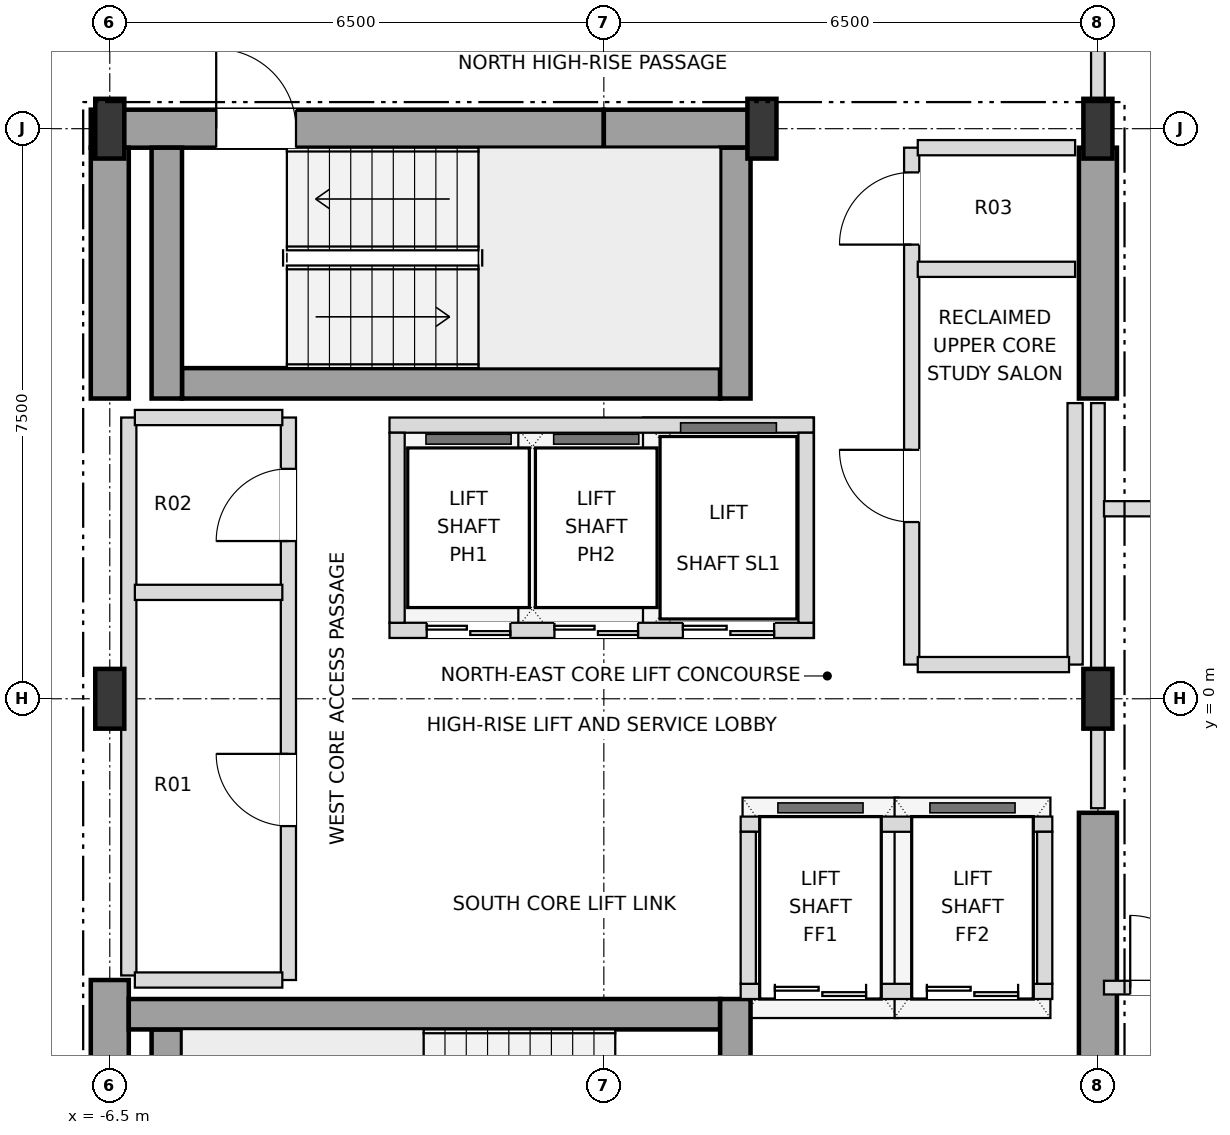
"""IFC4 building model, lengths in metres.
Left out: names, types, materials, properties, quantities, classifications, styles, units other than length and angle.
Written with IfcOpenShell. Run it as: python <this file> out.ifc"""

import sys

from ifc_helpers import new_model, si_unit, direction, frame, frame_2d, origin, origin_2d, place, context, subcontext, project, spatial, rectangle, i_section, extrude, element, fill, save


model = new_model("IFC4")
c1 = context("Model", 3, precision=1e-05, world=origin(), true_north=direction((0.0, 1.0)))
c2 = subcontext(c1, "Body", "Model", "MODEL_VIEW")
j1 = project(units=[si_unit("LENGTHUNIT", "METRE"), si_unit("PLANEANGLEUNIT", "RADIAN")], contexts=[c1])
p1 = place(None, origin())
s1 = spatial("IfcSite", under=j1, at=p1, CompositionType="ELEMENT")
p2 = place(p1, origin())
s2 = spatial("IfcBuilding", under=s1, at=p2, CompositionType="ELEMENT")
p3 = place(p2, frame((0.0, 0.0, 261.9)))
s3 = spatial("IfcBuildingStorey", under=s2, at=p3, CompositionType="ELEMENT", Elevation=261.9)
for number, where, z_axis, x_axis in (
    (1, (-6.5, 0.0, 0.0), (0.0, 0.0, 1.0), (1.0, 0.0, 0.0)),
    (2, (6.5, 0.0, 0.0), (0.0, 0.0, 1.0), (1.0, 0.0, 0.0)),
    (3, (-6.5, 7.5, 0.0), (0.0, 0.0, 1.0), (1.0, 0.0, 0.0)),
    (4, (2.08, 7.5, 0.0), (0.0, 0.0, 1.0), (1.0, 0.0, 0.0)),
    (5, (6.5, 7.5, 0.0), (0.0, 0.0, 1.0), (1.0, 0.0, 0.0)),
):
    element("IfcColumn", number, at=place(p3, frame(where, z_axis=z_axis, x_axis=x_axis)), inside=s3, PredefinedType="COLUMN", context=c2, shape_type="SweptSolid", body=[
        extrude(i_section(OverallWidth=0.382, OverallDepth=0.786, WebThickness=0.02, FlangeThickness=0.033, at=origin_2d()), origin(), (0.0, 0.0, 1.0), 3.6),
    ])
p4 = place(p3, frame((-6.75, 7.5, 0.0), z_axis=(0.0, 0.0, 1.0), x_axis=(1.0, 0.0, 0.0)))
e6 = element("IfcWall", 6, at=p4, inside=s3, PredefinedType="SHEAR", context=c2, shape_type="SweptSolid", body=[
    extrude(rectangle(XDim=6.75, YDim=0.5, at=frame_2d((3.375, 0.0))), origin(), (0.0, 0.0, 1.0), 3.38),
])
p5 = place(p4, frame((1.65, 0.0, 0.0)))
e7 = element("IfcOpeningElement", 7, at=p5, cuts=e6, PredefinedType="OPENING", context=c2, shape_type="SweptSolid", body=[
    extrude(rectangle(XDim=1.05, YDim=2.15, at=frame_2d((0.525, 1.075))), frame((0.0, 0.26, 0.0), z_axis=(0.0, -1.0, 0.0), x_axis=(1.0, 0.0, 0.0)), (0.0, 0.0, 1.0), 0.52),
])
p6 = place(p3, frame((0.0, 7.5, 0.0), z_axis=(0.0, 0.0, 1.0), x_axis=(1.0, 0.0, 0.0)))
e8 = element("IfcWall", 8, at=p6, inside=s3, PredefinedType="SHEAR", context=c2, shape_type="SweptSolid", body=[
    extrude(rectangle(XDim=2.08, YDim=0.5, at=frame_2d((1.04, 0.0))), origin(), (0.0, 0.0, 1.0), 3.38),
])
p7 = place(p3, frame((-6.5, -7.25, 0.0), z_axis=(0.0, 0.0, 1.0), x_axis=(0.0, 1.0, 0.0)))
e9 = element("IfcWall", 9, at=p7, inside=s3, PredefinedType="SHEAR", context=c2, shape_type="SweptSolid", body=[
    extrude(rectangle(XDim=3.55, YDim=0.5, at=frame_2d((1.775, 0.0))), origin(), (0.0, 0.0, 1.0), 3.38),
])
p8 = place(p3, frame((-6.5, 3.95, 0.0), z_axis=(0.0, 0.0, 1.0), x_axis=(0.0, 1.0, 0.0)))
e10 = element("IfcWall", 10, at=p8, inside=s3, PredefinedType="SHEAR", context=c2, shape_type="SweptSolid", body=[
    extrude(rectangle(XDim=3.3, YDim=0.5, at=frame_2d((1.65, 0.0))), origin(), (0.0, 0.0, 1.0), 3.38),
])
p9 = place(p3, frame((6.5, -7.25, 0.0), z_axis=(0.0, 0.0, 1.0), x_axis=(0.0, 1.0, 0.0)))
e11 = element("IfcWall", 11, at=p9, inside=s3, PredefinedType="SHEAR", context=c2, shape_type="SweptSolid", body=[
    extrude(rectangle(XDim=5.75, YDim=0.5, at=frame_2d((2.875, 0.0))), origin(), (0.0, 0.0, 1.0), 3.38),
])
p10 = place(p9, frame((0.85, 0.0, 0.0)))
e12 = element("IfcOpeningElement", 12, at=p10, cuts=e11, PredefinedType="OPENING", context=c2, shape_type="SweptSolid", body=[
    extrude(rectangle(XDim=1.05, YDim=2.15, at=frame_2d((0.525, 1.075))), frame((0.0, 0.26, 0.0), z_axis=(0.0, -1.0, 0.0), x_axis=(1.0, 0.0, 0.0)), (0.0, 0.0, 1.0), 0.52),
])
p11 = place(p3, frame((6.5, 3.95, 0.0), z_axis=(0.0, 0.0, 1.0), x_axis=(0.0, 1.0, 0.0)))
e13 = element("IfcWall", 13, at=p11, inside=s3, PredefinedType="SHEAR", context=c2, shape_type="SweptSolid", body=[
    extrude(rectangle(XDim=3.3, YDim=0.5, at=frame_2d((1.65, 0.0))), origin(), (0.0, 0.0, 1.0), 3.38),
])
p12 = place(p3, frame((-5.75, -7.25, 0.0), z_axis=(0.0, 0.0, 1.0), x_axis=(0.0, 1.0, 0.0)))
e14 = element("IfcWall", 14, at=p12, inside=s3, PredefinedType="SHEAR", context=c2, shape_type="SweptSolid", body=[
    extrude(rectangle(XDim=2.9, YDim=0.4, at=frame_2d((1.45, 0.0))), origin(), (0.0, 0.0, 1.0), 3.38),
])
p13 = place(p3, frame((-6.25, -4.15, 0.0), z_axis=(0.0, 0.0, 1.0), x_axis=(1.0, 0.0, 0.0)))
e15 = element("IfcWall", 15, at=p13, inside=s3, PredefinedType="SHEAR", context=c2, shape_type="SweptSolid", body=[
    extrude(rectangle(XDim=7.78, YDim=0.4, at=frame_2d((3.89, 0.0))), origin(), (0.0, 0.0, 1.0), 3.38),
])
p14 = place(p3, frame((1.73, -7.25, 0.0), z_axis=(0.0, 0.0, 1.0), x_axis=(0.0, 1.0, 0.0)))
e16 = element("IfcWall", 16, at=p14, inside=s3, PredefinedType="SHEAR", context=c2, shape_type="SweptSolid", body=[
    extrude(rectangle(XDim=3.3, YDim=0.4, at=frame_2d((1.65, 0.0))), origin(), (0.0, 0.0, 1.0), 3.38),
])
p15 = place(p14, frame((0.9, 0.0, 0.0)))
e17 = element("IfcOpeningElement", 17, at=p15, cuts=e16, PredefinedType="OPENING", context=c2, shape_type="SweptSolid", body=[
    extrude(rectangle(XDim=1.05, YDim=2.15, at=frame_2d((0.525, 1.075))), frame((0.0, 0.21, 0.0), z_axis=(0.0, -1.0, 0.0), x_axis=(1.0, 0.0, 0.0)), (0.0, 0.0, 1.0), 0.42),
])
p16 = place(p3, frame((-5.55, 4.15, 0.0), z_axis=(0.0, 0.0, 1.0), x_axis=(1.0, 0.0, 0.0)))
e18 = element("IfcWall", 18, at=p16, inside=s3, PredefinedType="SHEAR", context=c2, shape_type="SweptSolid", body=[
    extrude(rectangle(XDim=7.08, YDim=0.4, at=frame_2d((3.54, 0.0))), origin(), (0.0, 0.0, 1.0), 3.38),
])
for number, where, z_axis, x_axis in (
    (19, (1.73, 3.95, 0.0), (0.0, 0.0, 1.0), (0.0, 1.0, 0.0)),
    (20, (-5.75, 3.95, 0.0), (0.0, 0.0, 1.0), (0.0, 1.0, 0.0)),
):
    element("IfcWall", number, at=place(p3, frame(where, z_axis=z_axis, x_axis=x_axis)), inside=s3, PredefinedType="SHEAR", context=c2, shape_type="SweptSolid", body=[
        extrude(rectangle(XDim=3.3, YDim=0.4, at=frame_2d((1.65, 0.0))), origin(), (0.0, 0.0, 1.0), 3.38),
    ])
p17 = place(p3, frame((-2.82, 0.9, 0.0), z_axis=(0.0, 0.0, 1.0), x_axis=(1.0, 0.0, 0.0)))
e21 = element("IfcWall", 21, at=p17, inside=s3, PredefinedType="SOLIDWALL", context=c2, shape_type="SweptSolid", body=[
    extrude(rectangle(XDim=5.58, YDim=0.2, at=frame_2d((2.79, 0.0))), origin(), (0.0, 0.0, 1.0), 3.38),
])
p18 = place(p17, frame((0.49, 0.0, 0.0)))
e22 = element("IfcOpeningElement", 22, at=p18, cuts=e21, PredefinedType="OPENING", context=c2, shape_type="SweptSolid", body=[
    extrude(rectangle(XDim=1.1, YDim=2.15, at=frame_2d((0.55, 1.075))), frame((0.0, 0.11, 0.0), z_axis=(0.0, -1.0, 0.0), x_axis=(1.0, 0.0, 0.0)), (0.0, 0.0, 1.0), 0.22),
])
p19 = place(p17, frame((2.17, 0.0, 0.0)))
e23 = element("IfcOpeningElement", 23, at=p19, cuts=e21, PredefinedType="OPENING", context=c2, shape_type="SweptSolid", body=[
    extrude(rectangle(XDim=1.1, YDim=2.15, at=frame_2d((0.55, 1.075))), frame((0.0, 0.11, 0.0), z_axis=(0.0, -1.0, 0.0), x_axis=(1.0, 0.0, 0.0)), (0.0, 0.0, 1.0), 0.22),
])
p20 = place(p17, frame((3.86, 0.0, 0.0)))
e24 = element("IfcOpeningElement", 24, at=p20, cuts=e21, PredefinedType="OPENING", context=c2, shape_type="SweptSolid", body=[
    extrude(rectangle(XDim=1.2, YDim=2.2, at=frame_2d((0.6, 1.1))), frame((0.0, 0.11, 0.0), z_axis=(0.0, -1.0, 0.0), x_axis=(1.0, 0.0, 0.0)), (0.0, 0.0, 1.0), 0.22),
])
p21 = place(p3, frame((-2.82, 3.6, 0.0), z_axis=(0.0, 0.0, 1.0), x_axis=(1.0, 0.0, 0.0)))
e25 = element("IfcWall", 25, at=p21, inside=s3, PredefinedType="SOLIDWALL", context=c2, shape_type="SweptSolid", body=[
    extrude(rectangle(XDim=5.58, YDim=0.2, at=frame_2d((2.79, 0.0))), origin(), (0.0, 0.0, 1.0), 3.38),
])
for number, where, z_axis, x_axis in (
    (26, (-2.72, 1.0, 0.0), (0.0, 0.0, 1.0), (0.0, 1.0, 0.0)),
    (27, (2.66, 1.0, 0.0), (0.0, 0.0, 1.0), (0.0, 1.0, 0.0)),
):
    element("IfcWall", number, at=place(p3, frame(where, z_axis=z_axis, x_axis=x_axis)), inside=s3, PredefinedType="SOLIDWALL", context=c2, shape_type="SweptSolid", body=[
        extrude(rectangle(XDim=2.5, YDim=0.2, at=frame_2d((1.25, 0.0))), origin(), (0.0, 0.0, 1.0), 3.38),
    ])
p22 = place(p3, frame((1.8, -3.85, 0.0), z_axis=(0.0, 0.0, 1.0), x_axis=(1.0, 0.0, 0.0)))
e28 = element("IfcWall", 28, at=p22, inside=s3, PredefinedType="SOLIDWALL", context=c2, shape_type="SweptSolid", body=[
    extrude(rectangle(XDim=4.1, YDim=0.2, at=frame_2d((2.05, 0.0))), origin(), (0.0, 0.0, 1.0), 3.38),
])
p23 = place(p22, frame((0.45, 0.0, 0.0)))
e29 = element("IfcOpeningElement", 29, at=p23, cuts=e28, PredefinedType="OPENING", context=c2, shape_type="SweptSolid", body=[
    extrude(rectangle(XDim=1.2, YDim=2.2, at=frame_2d((0.6, 1.1))), frame((0.0, 0.11, 0.0), z_axis=(0.0, -1.0, 0.0), x_axis=(1.0, 0.0, 0.0)), (0.0, 0.0, 1.0), 0.22),
])
p24 = place(p22, frame((2.45, 0.0, 0.0)))
e30 = element("IfcOpeningElement", 30, at=p24, cuts=e28, PredefinedType="OPENING", context=c2, shape_type="SweptSolid", body=[
    extrude(rectangle(XDim=1.2, YDim=2.2, at=frame_2d((0.6, 1.1))), frame((0.0, 0.11, 0.0), z_axis=(0.0, -1.0, 0.0), x_axis=(1.0, 0.0, 0.0)), (0.0, 0.0, 1.0), 0.22),
])
p25 = place(p3, frame((1.8, -1.65, 0.0), z_axis=(0.0, 0.0, 1.0), x_axis=(1.0, 0.0, 0.0)))
e31 = element("IfcWall", 31, at=p25, inside=s3, PredefinedType="SOLIDWALL", context=c2, shape_type="SweptSolid", body=[
    extrude(rectangle(XDim=4.1, YDim=0.2, at=frame_2d((2.05, 0.0))), origin(), (0.0, 0.0, 1.0), 3.38),
])
for number, where, z_axis, x_axis in (
    (32, (1.9, -3.75, 0.0), (0.0, 0.0, 1.0), (0.0, 1.0, 0.0)),
    (33, (5.8, -3.75, 0.0), (0.0, 0.0, 1.0), (0.0, 1.0, 0.0)),
):
    element("IfcWall", number, at=place(p3, frame(where, z_axis=z_axis, x_axis=x_axis)), inside=s3, PredefinedType="SOLIDWALL", context=c2, shape_type="SweptSolid", body=[
        extrude(rectangle(XDim=2.0, YDim=0.2, at=frame_2d((1.0, 0.0))), origin(), (0.0, 0.0, 1.0), 3.38),
    ])
p26 = place(p3, frame((-6.25, -3.64, 0.0), z_axis=(0.0, 0.0, 1.0), x_axis=(0.0, 1.0, 0.0)))
e34 = element("IfcWall", 34, at=p26, inside=s3, PredefinedType="SOLIDWALL", context=c2, shape_type="SweptSolid", body=[
    extrude(rectangle(XDim=7.34, YDim=0.2, at=frame_2d((3.67, 0.0))), origin(), (0.0, 0.0, 1.0), 3.38),
])
p27 = place(p3, frame((-4.15, -3.7, 0.0), z_axis=(0.0, 0.0, 1.0), x_axis=(0.0, 1.0, 0.0)))
e35 = element("IfcWall", 35, at=p27, inside=s3, PredefinedType="SOLIDWALL", context=c2, shape_type="SweptSolid", body=[
    extrude(rectangle(XDim=7.4, YDim=0.2, at=frame_2d((3.7, 0.0))), origin(), (0.0, 0.0, 1.0), 3.38),
])
p28 = place(p27, frame((2.025, 0.0, 0.0)))
e36 = element("IfcOpeningElement", 36, at=p28, cuts=e35, PredefinedType="OPENING", context=c2, shape_type="SweptSolid", body=[
    extrude(rectangle(XDim=0.95, YDim=2.15, at=frame_2d((0.475, 1.075))), frame((0.0, 0.11, 0.0), z_axis=(0.0, -1.0, 0.0), x_axis=(1.0, 0.0, 0.0)), (0.0, 0.0, 1.0), 0.22),
])
p29 = place(p27, frame((5.775, 0.0, 0.0)))
e37 = element("IfcOpeningElement", 37, at=p29, cuts=e35, PredefinedType="OPENING", context=c2, shape_type="SweptSolid", body=[
    extrude(rectangle(XDim=0.95, YDim=2.15, at=frame_2d((0.475, 1.075))), frame((0.0, 0.11, 0.0), z_axis=(0.0, -1.0, 0.0), x_axis=(1.0, 0.0, 0.0)), (0.0, 0.0, 1.0), 0.22),
])
p30 = place(p3, frame((4.05, 0.45, 0.0), z_axis=(0.0, 0.0, 1.0), x_axis=(0.0, 1.0, 0.0)))
e38 = element("IfcWall", 38, at=p30, inside=s3, PredefinedType="SOLIDWALL", context=c2, shape_type="SweptSolid", body=[
    extrude(rectangle(XDim=6.8, YDim=0.2, at=frame_2d((3.4, 0.0))), origin(), (0.0, 0.0, 1.0), 3.38),
])
p31 = place(p30, frame((1.875, 0.0, 0.0)))
e39 = element("IfcOpeningElement", 39, at=p31, cuts=e38, PredefinedType="OPENING", context=c2, shape_type="SweptSolid", body=[
    extrude(rectangle(XDim=0.95, YDim=2.15, at=frame_2d((0.475, 1.075))), frame((0.0, 0.11, 0.0), z_axis=(0.0, -1.0, 0.0), x_axis=(1.0, 0.0, 0.0)), (0.0, 0.0, 1.0), 0.22),
])
p32 = place(p30, frame((5.525, 0.0, 0.0)))
e40 = element("IfcOpeningElement", 40, at=p32, cuts=e38, PredefinedType="OPENING", context=c2, shape_type="SweptSolid", body=[
    extrude(rectangle(XDim=0.95, YDim=2.15, at=frame_2d((0.475, 1.075))), frame((0.0, 0.11, 0.0), z_axis=(0.0, -1.0, 0.0), x_axis=(1.0, 0.0, 0.0)), (0.0, 0.0, 1.0), 0.22),
])
p33 = place(p3, frame((6.2, 0.45, 0.0), z_axis=(0.0, 0.0, 1.0), x_axis=(0.0, 1.0, 0.0)))
e41 = element("IfcWall", 41, at=p33, inside=s3, PredefinedType="SOLIDWALL", context=c2, shape_type="SweptSolid", body=[
    extrude(rectangle(XDim=3.44, YDim=0.2, at=frame_2d((1.72, 0.0))), origin(), (0.0, 0.0, 1.0), 3.38),
])
p34 = place(p3, frame((6.5, -1.44, 0.0), z_axis=(0.0, 0.0, 1.0), x_axis=(0.0, 1.0, 0.0)))
e42 = element("IfcWall", 42, at=p34, inside=s3, PredefinedType="PARTITIONING", context=c2, shape_type="SweptSolid", body=[
    extrude(rectangle(XDim=5.33, YDim=0.18, at=frame_2d((2.665, 0.0))), origin(), (0.0, 0.0, 1.0), 2.826),
])
p35 = place(p3, frame((6.5, 7.31, 0.0), z_axis=(0.0, 0.0, 1.0), x_axis=(0.0, 1.0, 0.0)))
e43 = element("IfcWall", 43, at=p35, inside=s3, PredefinedType="PARTITIONING", context=c2, shape_type="SweptSolid", body=[
    extrude(rectangle(XDim=1.94, YDim=0.18, at=frame_2d((0.97, 0.0))), origin(), (0.0, 0.0, 1.0), 2.826),
])
p36 = place(p3, frame((6.58, -3.8, 0.0), z_axis=(0.0, 0.0, 1.0), x_axis=(1.0, 0.0, 0.0)))
e44 = element("IfcWall", 44, at=p36, inside=s3, PredefinedType="PARTITIONING", context=c2, shape_type="SweptSolid", body=[
    extrude(rectangle(XDim=1.64, YDim=0.18, at=frame_2d((0.82, 0.0))), origin(), (0.0, 0.0, 1.0), 3.38),
])
p37 = place(p36, frame((0.345, 0.0, 0.0)))
e45 = element("IfcOpeningElement", 45, at=p37, cuts=e44, PredefinedType="OPENING", context=c2, shape_type="SweptSolid", body=[
    extrude(rectangle(XDim=0.95, YDim=2.15, at=frame_2d((0.475, 1.075))), frame((0.0, 0.1, 0.0), z_axis=(0.0, -1.0, 0.0), x_axis=(1.0, 0.0, 0.0)), (0.0, 0.0, 1.0), 0.2),
])
p38 = place(p3, frame((-6.17, -3.7, 0.0), z_axis=(0.0, 0.0, 1.0), x_axis=(1.0, 0.0, 0.0)))
e46 = element("IfcWall", 46, at=p38, inside=s3, PredefinedType="SOLIDWALL", context=c2, shape_type="SweptSolid", body=[
    extrude(rectangle(XDim=1.94, YDim=0.2, at=frame_2d((0.97, 0.0))), origin(), (0.0, 0.0, 1.0), 3.38),
])
p39 = place(p3, frame((4.13, 0.45, 0.0), z_axis=(0.0, 0.0, 1.0), x_axis=(1.0, 0.0, 0.0)))
e47 = element("IfcWall", 47, at=p39, inside=s3, PredefinedType="SOLIDWALL", context=c2, shape_type="SweptSolid", body=[
    extrude(rectangle(XDim=1.99, YDim=0.2, at=frame_2d((0.995, 0.0))), origin(), (0.0, 0.0, 1.0), 3.38),
])
p40 = place(p3, frame((-6.17, 1.4, 0.0), z_axis=(0.0, 0.0, 1.0), x_axis=(1.0, 0.0, 0.0)))
e48 = element("IfcWall", 48, at=p40, inside=s3, PredefinedType="SOLIDWALL", context=c2, shape_type="SweptSolid", body=[
    extrude(rectangle(XDim=1.94, YDim=0.2, at=frame_2d((0.97, 0.0))), origin(), (0.0, 0.0, 1.0), 3.38),
])
p41 = place(p3, frame((6.58, 2.5, 0.0), z_axis=(0.0, 0.0, 1.0), x_axis=(1.0, 0.0, 0.0)))
e49 = element("IfcWall", 49, at=p41, inside=s3, PredefinedType="SOLIDWALL", context=c2, shape_type="SweptSolid", body=[
    extrude(rectangle(XDim=3.34, YDim=0.2, at=frame_2d((1.67, 0.0))), origin(), (0.0, 0.0, 1.0), 3.38),
])
p42 = place(p41, frame((1.145, 0.0, 0.0)))
e50 = element("IfcOpeningElement", 50, at=p42, cuts=e49, PredefinedType="OPENING", context=c2, shape_type="SweptSolid", body=[
    extrude(rectangle(XDim=0.95, YDim=2.15, at=frame_2d((0.475, 1.075))), frame((0.0, 0.11, 0.0), z_axis=(0.0, -1.0, 0.0), x_axis=(1.0, 0.0, 0.0)), (0.0, 0.0, 1.0), 0.22),
])
p43 = place(p3, frame((-6.17, 3.7, 0.0), z_axis=(0.0, 0.0, 1.0), x_axis=(1.0, 0.0, 0.0)))
e51 = element("IfcWall", 51, at=p43, inside=s3, PredefinedType="SOLIDWALL", context=c2, shape_type="SweptSolid", body=[
    extrude(rectangle(XDim=1.94, YDim=0.2, at=frame_2d((0.97, 0.0))), origin(), (0.0, 0.0, 1.0), 3.38),
])
for number, where, z_axis, x_axis in (
    (52, (4.13, 5.65, 0.0), (0.0, 0.0, 1.0), (1.0, 0.0, 0.0)),
    (53, (4.13, 7.25, 0.0), (0.0, 0.0, 1.0), (1.0, 0.0, 0.0)),
):
    element("IfcWall", number, at=place(p3, frame(where, z_axis=z_axis, x_axis=x_axis)), inside=s3, PredefinedType="SOLIDWALL", context=c2, shape_type="SweptSolid", body=[
        extrude(rectangle(XDim=2.07, YDim=0.2, at=frame_2d((1.035, 0.0))), origin(), (0.0, 0.0, 1.0), 3.38),
    ])
p44 = place(p5, origin())
e54 = element("IfcDoor", 54, at=p44, inside=s3, OperationType="SINGLE_SWING_LEFT", PredefinedType="DOOR", context=c2, shape_type="SweptSolid", body=[
    extrude(rectangle(XDim=1.05, YDim=2.15, at=frame_2d((0.525, 1.075))), frame((0.0, 0.025, 0.0), z_axis=(0.0, -1.0, 0.0), x_axis=(1.0, 0.0, 0.0)), (0.0, 0.0, 1.0), 0.05),
])
fill(e7, e54)
p45 = place(p18, origin())
e55 = element("IfcDoor", 55, at=p45, inside=s3, OperationType="DOUBLE_DOOR_SLIDING", PredefinedType="DOOR", context=c2, shape_type="SweptSolid", body=[
    extrude(rectangle(XDim=1.1, YDim=2.15, at=frame_2d((0.55, 1.075))), frame((0.0, 0.025, 0.0), z_axis=(0.0, -1.0, 0.0), x_axis=(1.0, 0.0, 0.0)), (0.0, 0.0, 1.0), 0.05),
])
fill(e22, e55)
p46 = place(p19, origin())
e56 = element("IfcDoor", 56, at=p46, inside=s3, OperationType="DOUBLE_DOOR_SLIDING", PredefinedType="DOOR", context=c2, shape_type="SweptSolid", body=[
    extrude(rectangle(XDim=1.1, YDim=2.15, at=frame_2d((0.55, 1.075))), frame((0.0, 0.025, 0.0), z_axis=(0.0, -1.0, 0.0), x_axis=(1.0, 0.0, 0.0)), (0.0, 0.0, 1.0), 0.05),
])
fill(e23, e56)
p47 = place(p20, origin())
e57 = element("IfcDoor", 57, at=p47, inside=s3, OperationType="DOUBLE_DOOR_SLIDING", PredefinedType="DOOR", context=c2, shape_type="SweptSolid", body=[
    extrude(rectangle(XDim=1.2, YDim=2.2, at=frame_2d((0.6, 1.1))), frame((0.0, 0.025, 0.0), z_axis=(0.0, -1.0, 0.0), x_axis=(1.0, 0.0, 0.0)), (0.0, 0.0, 1.0), 0.05),
])
fill(e24, e57)
p48 = place(p23, origin())
e58 = element("IfcDoor", 58, at=p48, inside=s3, OperationType="DOUBLE_DOOR_SLIDING", PredefinedType="DOOR", context=c2, shape_type="SweptSolid", body=[
    extrude(rectangle(XDim=1.2, YDim=2.2, at=frame_2d((0.6, 1.1))), frame((0.0, 0.025, 0.0), z_axis=(0.0, -1.0, 0.0), x_axis=(1.0, 0.0, 0.0)), (0.0, 0.0, 1.0), 0.05),
])
fill(e29, e58)
p49 = place(p24, origin())
e59 = element("IfcDoor", 59, at=p49, inside=s3, OperationType="DOUBLE_DOOR_SLIDING", PredefinedType="DOOR", context=c2, shape_type="SweptSolid", body=[
    extrude(rectangle(XDim=1.2, YDim=2.2, at=frame_2d((0.6, 1.1))), frame((0.0, 0.025, 0.0), z_axis=(0.0, -1.0, 0.0), x_axis=(1.0, 0.0, 0.0)), (0.0, 0.0, 1.0), 0.05),
])
fill(e30, e59)
p50 = place(p28, origin())
e60 = element("IfcDoor", 60, at=p50, inside=s3, OperationType="SINGLE_SWING_RIGHT", PredefinedType="DOOR", context=c2, shape_type="SweptSolid", body=[
    extrude(rectangle(XDim=0.95, YDim=2.15, at=frame_2d((0.475, 1.075))), frame((0.0, 0.025, 0.0), z_axis=(0.0, -1.0, 0.0), x_axis=(1.0, 0.0, 0.0)), (0.0, 0.0, 1.0), 0.05),
])
fill(e36, e60)
p51 = place(p29, origin())
e61 = element("IfcDoor", 61, at=p51, inside=s3, OperationType="SINGLE_SWING_LEFT", PredefinedType="DOOR", context=c2, shape_type="SweptSolid", body=[
    extrude(rectangle(XDim=0.95, YDim=2.15, at=frame_2d((0.475, 1.075))), frame((0.0, 0.025, 0.0), z_axis=(0.0, -1.0, 0.0), x_axis=(1.0, 0.0, 0.0)), (0.0, 0.0, 1.0), 0.05),
])
fill(e37, e61)
p52 = place(p31, origin())
e62 = element("IfcDoor", 62, at=p52, inside=s3, OperationType="SINGLE_SWING_RIGHT", PredefinedType="DOOR", context=c2, shape_type="SweptSolid", body=[
    extrude(rectangle(XDim=0.95, YDim=2.15, at=frame_2d((0.475, 1.075))), frame((0.0, 0.025, 0.0), z_axis=(0.0, -1.0, 0.0), x_axis=(1.0, 0.0, 0.0)), (0.0, 0.0, 1.0), 0.05),
])
fill(e39, e62)
p53 = place(p32, origin())
e63 = element("IfcDoor", 63, at=p53, inside=s3, OperationType="SINGLE_SWING_LEFT", PredefinedType="DOOR", context=c2, shape_type="SweptSolid", body=[
    extrude(rectangle(XDim=0.95, YDim=2.15, at=frame_2d((0.475, 1.075))), frame((0.0, 0.025, 0.0), z_axis=(0.0, -1.0, 0.0), x_axis=(1.0, 0.0, 0.0)), (0.0, 0.0, 1.0), 0.05),
])
fill(e40, e63)
p54 = place(p37, origin())
e64 = element("IfcDoor", 64, at=p54, inside=s3, OperationType="SINGLE_SWING_LEFT", PredefinedType="DOOR", context=c2, shape_type="SweptSolid", body=[
    extrude(rectangle(XDim=0.95, YDim=2.15, at=frame_2d((0.475, 1.075))), frame((0.0, 0.025, 0.0), z_axis=(0.0, -1.0, 0.0), x_axis=(1.0, 0.0, 0.0)), (0.0, 0.0, 1.0), 0.05),
])
fill(e45, e64)
save(model, sys.argv[1])
